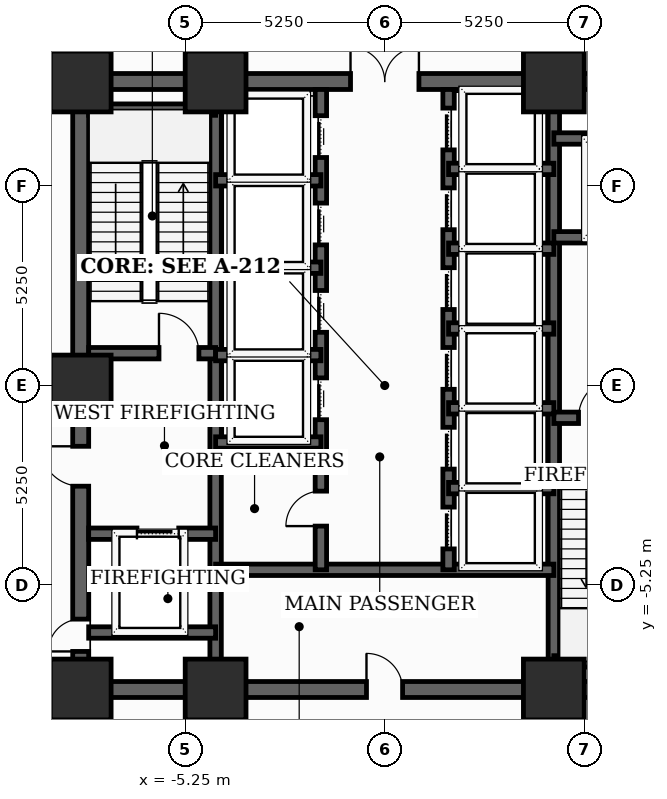
"""IFC4 building model, lengths in metres.
Left out: names, types, materials, properties, quantities, classifications, styles, units other than length and angle.
Written with IfcOpenShell. Run it as: python <this file> out.ifc"""

import sys

from ifc_helpers import new_model, si_unit, direction, frame, frame_2d, origin, origin_2d, place, context, subcontext, project, spatial, rectangle, extrude, element, fill, save


model = new_model("IFC4")
c1 = context("Model", 3, precision=1e-05, world=origin(), true_north=direction((0.0, 1.0)))
c2 = subcontext(c1, "Body", "Model", "MODEL_VIEW")
j1 = project(units=[si_unit("LENGTHUNIT", "METRE"), si_unit("PLANEANGLEUNIT", "RADIAN")], contexts=[c1])
p1 = place(None, origin())
s1 = spatial("IfcSite", under=j1, at=p1, CompositionType="ELEMENT")
p2 = place(p1, origin())
s2 = spatial("IfcBuilding", under=s1, at=p2, CompositionType="ELEMENT")
p3 = place(p2, frame((0.0, 0.0, 15.6)))
s3 = spatial("IfcBuildingStorey", under=s2, at=p3, CompositionType="ELEMENT", Elevation=15.6)
for number, where, z_axis, x_axis in (
    (1, (-8.0, -8.0, 0.0), (0.0, 0.0, 1.0), (1.0, 0.0, 0.0)),
    (2, (-4.45, -8.0, 0.0), (0.0, 0.0, 1.0), (1.0, 0.0, 0.0)),
    (3, (4.45, -8.0, 0.0), (0.0, 0.0, 1.0), (1.0, 0.0, 0.0)),
    (4, (4.45, 8.0, 0.0), (0.0, 0.0, 1.0), (1.0, 0.0, 0.0)),
    (5, (-4.45, 8.0, 0.0), (0.0, 0.0, 1.0), (1.0, 0.0, 0.0)),
    (6, (-8.0, 8.0, 0.0), (0.0, 0.0, 1.0), (1.0, 0.0, 0.0)),
    (7, (-8.0, 0.0, 0.0), (0.0, 0.0, 1.0), (1.0, 0.0, 0.0)),
):
    element("IfcColumn", number, at=place(p3, frame(where, z_axis=z_axis, x_axis=x_axis)), inside=s3, PredefinedType="COLUMN", context=c2, shape_type="SweptSolid", body=[
        extrude(rectangle(XDim=1.6, YDim=1.6, at=origin_2d()), origin(), (0.0, 0.0, 1.0), 5.2),
    ])
p4 = place(p3, frame((-8.0, -8.0, 0.0), z_axis=(0.0, 0.0, 1.0), x_axis=(0.0, 1.0, 0.0)))
e8 = element("IfcWall", 8, at=p4, inside=s3, PredefinedType="SHEAR", context=c2, shape_type="SweptSolid", body=[
    extrude(rectangle(XDim=16.0, YDim=0.42, at=frame_2d((8.0, 0.0))), origin(), (0.0, 0.0, 1.0), 4.95),
])
p5 = place(p4, frame((1.002, 0.0, 0.0)))
e9 = element("IfcOpeningElement", 9, at=p5, cuts=e8, PredefinedType="OPENING", context=c2, shape_type="SweptSolid", body=[
    extrude(rectangle(XDim=0.85, YDim=2.02, at=frame_2d((0.425, 1.01))), frame((0.0, 0.22, 0.0), z_axis=(0.0, -1.0, 0.0), x_axis=(1.0, 0.0, 0.0)), (0.0, 0.0, 1.0), 0.44),
])
p6 = place(p4, frame((5.35, 0.0, 0.0)))
e10 = element("IfcOpeningElement", 10, at=p6, cuts=e8, PredefinedType="OPENING", context=c2, shape_type="SweptSolid", body=[
    extrude(rectangle(XDim=1.05, YDim=2.15, at=frame_2d((0.525, 1.075))), frame((0.0, 0.22, 0.0), z_axis=(0.0, -1.0, 0.0), x_axis=(1.0, 0.0, 0.0)), (0.0, 0.0, 1.0), 0.44),
])
p7 = place(p3, frame((-8.0, -8.0, 0.0), z_axis=(0.0, 0.0, 1.0), x_axis=(1.0, 0.0, 0.0)))
e11 = element("IfcWall", 11, at=p7, inside=s3, PredefinedType="SHEAR", context=c2, shape_type="SweptSolid", body=[
    extrude(rectangle(XDim=16.0, YDim=0.42, at=frame_2d((8.0, 0.0))), origin(), (0.0, 0.0, 1.0), 4.95),
])
p8 = place(p7, frame((7.52, 0.0, 0.0)))
e12 = element("IfcOpeningElement", 12, at=p8, cuts=e11, PredefinedType="OPENING", context=c2, shape_type="SweptSolid", body=[
    extrude(rectangle(XDim=0.95, YDim=2.1, at=frame_2d((0.475, 1.05))), frame((0.0, 0.22, 0.0), z_axis=(0.0, -1.0, 0.0), x_axis=(1.0, 0.0, 0.0)), (0.0, 0.0, 1.0), 0.44),
])
p9 = place(p3, frame((-8.0, 8.0, 0.0), z_axis=(0.0, 0.0, 1.0), x_axis=(1.0, 0.0, 0.0)))
e13 = element("IfcWall", 13, at=p9, inside=s3, PredefinedType="SHEAR", context=c2, shape_type="SweptSolid", body=[
    extrude(rectangle(XDim=16.0, YDim=0.42, at=frame_2d((8.0, 0.0))), origin(), (0.0, 0.0, 1.0), 4.95),
])
p10 = place(p9, frame((7.1, 0.0, 0.0)))
e14 = element("IfcOpeningElement", 14, at=p10, cuts=e13, PredefinedType="OPENING", context=c2, shape_type="SweptSolid", body=[
    extrude(rectangle(XDim=1.8, YDim=2.15, at=frame_2d((0.9, 1.075))), frame((0.0, 0.22, 0.0), z_axis=(0.0, -1.0, 0.0), x_axis=(1.0, 0.0, 0.0)), (0.0, 0.0, 1.0), 0.44),
])
for number, where, z_axis, x_axis in (
    (15, (-4.45, -7.79, 0.0), (0.0, 0.0, 1.0), (0.0, 1.0, 0.0)),
    (16, (4.45, -7.79, 0.0), (0.0, 0.0, 1.0), (0.0, 1.0, 0.0)),
):
    element("IfcWall", number, at=place(p3, frame(where, z_axis=z_axis, x_axis=x_axis)), inside=s3, PredefinedType="SHEAR", context=c2, shape_type="SweptSolid", body=[
        extrude(rectangle(XDim=15.58, YDim=0.3, at=frame_2d((7.79, 0.0))), origin(), (0.0, 0.0, 1.0), 4.95),
    ])
p11 = place(p3, frame((-7.79, 0.85, 0.0), z_axis=(0.0, 0.0, 1.0), x_axis=(1.0, 0.0, 0.0)))
e17 = element("IfcWall", 17, at=p11, inside=s3, PredefinedType="SHEAR", context=c2, shape_type="SweptSolid", body=[
    extrude(rectangle(XDim=3.34, YDim=0.3, at=frame_2d((1.67, 0.0))), origin(), (0.0, 0.0, 1.0), 4.95),
])
p12 = place(p11, frame((1.85, 0.0, 0.0)))
e18 = element("IfcOpeningElement", 18, at=p12, cuts=e17, PredefinedType="OPENING", context=c2, shape_type="SweptSolid", body=[
    extrude(rectangle(XDim=1.05, YDim=2.15, at=frame_2d((0.525, 1.075))), frame((0.0, 0.16, 0.0), z_axis=(0.0, -1.0, 0.0), x_axis=(1.0, 0.0, 0.0)), (0.0, 0.0, 1.0), 0.32),
])
p13 = place(p3, frame((-7.79, 7.26, 0.0), z_axis=(0.0, 0.0, 1.0), x_axis=(1.0, 0.0, 0.0)))
e19 = element("IfcWall", 19, at=p13, inside=s3, PredefinedType="SHEAR", context=c2, shape_type="SweptSolid", body=[
    extrude(rectangle(XDim=3.34, YDim=0.3, at=frame_2d((1.67, 0.0))), origin(), (0.0, 0.0, 1.0), 4.95),
])
p14 = place(p3, frame((4.45, -0.85, 0.0), z_axis=(0.0, 0.0, 1.0), x_axis=(1.0, 0.0, 0.0)))
e20 = element("IfcWall", 20, at=p14, inside=s3, PredefinedType="SHEAR", context=c2, shape_type="SweptSolid", body=[
    extrude(rectangle(XDim=3.34, YDim=0.3, at=frame_2d((1.67, 0.0))), origin(), (0.0, 0.0, 1.0), 4.95),
])
p15 = place(p14, frame((0.65, 0.0, 0.0)))
e21 = element("IfcOpeningElement", 21, at=p15, cuts=e20, PredefinedType="OPENING", context=c2, shape_type="SweptSolid", body=[
    extrude(rectangle(XDim=1.05, YDim=2.15, at=frame_2d((0.525, 1.075))), frame((0.0, 0.16, 0.0), z_axis=(0.0, -1.0, 0.0), x_axis=(1.0, 0.0, 0.0)), (0.0, 0.0, 1.0), 0.32),
])
p16 = place(p3, frame((4.45, -7.26, 0.0), z_axis=(0.0, 0.0, 1.0), x_axis=(1.0, 0.0, 0.0)))
e22 = element("IfcWall", 22, at=p16, inside=s3, PredefinedType="SHEAR", context=c2, shape_type="SweptSolid", body=[
    extrude(rectangle(XDim=3.55, YDim=0.3, at=frame_2d((1.775, 0.0))), origin(), (0.0, 0.0, 1.0), 4.95),
])
p17 = place(p3, frame((-7.79, -3.9, 0.0), z_axis=(0.0, 0.0, 1.0), x_axis=(1.0, 0.0, 0.0)))
e23 = element("IfcWall", 23, at=p17, inside=s3, PredefinedType="SHEAR", context=c2, shape_type="SweptSolid", body=[
    extrude(rectangle(XDim=3.34, YDim=0.3, at=frame_2d((1.67, 0.0))), origin(), (0.0, 0.0, 1.0), 4.95),
])
p18 = place(p17, frame((1.27, 0.0, 0.0)))
e24 = element("IfcOpeningElement", 24, at=p18, cuts=e23, PredefinedType="OPENING", context=c2, shape_type="SweptSolid", body=[
    extrude(rectangle(XDim=1.1, YDim=2.1, at=frame_2d((0.55, 1.05))), frame((0.0, 0.16, 0.0), z_axis=(0.0, -1.0, 0.0), x_axis=(1.0, 0.0, 0.0)), (0.0, 0.0, 1.0), 0.32),
])
p19 = place(p3, frame((-7.79, -6.5, 0.0), z_axis=(0.0, 0.0, 1.0), x_axis=(1.0, 0.0, 0.0)))
e25 = element("IfcWall", 25, at=p19, inside=s3, PredefinedType="SHEAR", context=c2, shape_type="SweptSolid", body=[
    extrude(rectangle(XDim=3.34, YDim=0.3, at=frame_2d((1.67, 0.0))), origin(), (0.0, 0.0, 1.0), 4.95),
])
p20 = place(p3, frame((4.45, 3.9, 0.0), z_axis=(0.0, 0.0, 1.0), x_axis=(1.0, 0.0, 0.0)))
e26 = element("IfcWall", 26, at=p20, inside=s3, PredefinedType="SHEAR", context=c2, shape_type="SweptSolid", body=[
    extrude(rectangle(XDim=3.34, YDim=0.3, at=frame_2d((1.67, 0.0))), origin(), (0.0, 0.0, 1.0), 4.95),
])
p21 = place(p20, frame((1.18, 0.0, 0.0)))
e27 = element("IfcOpeningElement", 27, at=p21, cuts=e26, PredefinedType="OPENING", context=c2, shape_type="SweptSolid", body=[
    extrude(rectangle(XDim=1.1, YDim=2.1, at=frame_2d((0.55, 1.05))), frame((0.0, 0.16, 0.0), z_axis=(0.0, -1.0, 0.0), x_axis=(1.0, 0.0, 0.0)), (0.0, 0.0, 1.0), 0.32),
])
p22 = place(p3, frame((4.45, 6.5, 0.0), z_axis=(0.0, 0.0, 1.0), x_axis=(1.0, 0.0, 0.0)))
e28 = element("IfcWall", 28, at=p22, inside=s3, PredefinedType="SHEAR", context=c2, shape_type="SweptSolid", body=[
    extrude(rectangle(XDim=3.34, YDim=0.3, at=frame_2d((1.67, 0.0))), origin(), (0.0, 0.0, 1.0), 4.95),
])
p23 = place(p3, frame((-4.45, -4.85, 0.0), z_axis=(0.0, 0.0, 1.0), x_axis=(1.0, 0.0, 0.0)))
e29 = element("IfcWall", 29, at=p23, inside=s3, PredefinedType="SHEAR", context=c2, shape_type="SweptSolid", body=[
    extrude(rectangle(XDim=8.9, YDim=0.3, at=frame_2d((4.45, 0.0))), origin(), (0.0, 0.0, 1.0), 4.95),
])
p24 = place(p3, frame((-1.68, -4.85, 0.0), z_axis=(0.0, 0.0, 1.0), x_axis=(0.0, 1.0, 0.0)))
e30 = element("IfcWall", 30, at=p24, inside=s3, PredefinedType="SHEAR", context=c2, shape_type="SweptSolid", body=[
    extrude(rectangle(XDim=12.64, YDim=0.3, at=frame_2d((6.32, 0.0))), origin(), (0.0, 0.0, 1.0), 4.95),
])
p25 = place(p24, frame((3.95, 0.0, 0.0)))
e31 = element("IfcOpeningElement", 31, at=p25, cuts=e30, PredefinedType="OPENING", context=c2, shape_type="SweptSolid", body=[
    extrude(rectangle(XDim=1.1, YDim=2.1, at=frame_2d((0.55, 1.05))), frame((0.0, 0.16, 0.0), z_axis=(0.0, -1.0, 0.0), x_axis=(1.0, 0.0, 0.0)), (0.0, 0.0, 1.0), 0.32),
])
p26 = place(p24, frame((6.25, 0.0, 0.0)))
e32 = element("IfcOpeningElement", 32, at=p26, cuts=e30, PredefinedType="OPENING", context=c2, shape_type="SweptSolid", body=[
    extrude(rectangle(XDim=1.1, YDim=2.1, at=frame_2d((0.55, 1.05))), frame((0.0, 0.16, 0.0), z_axis=(0.0, -1.0, 0.0), x_axis=(1.0, 0.0, 0.0)), (0.0, 0.0, 1.0), 0.32),
])
p27 = place(p24, frame((8.55, 0.0, 0.0)))
e33 = element("IfcOpeningElement", 33, at=p27, cuts=e30, PredefinedType="OPENING", context=c2, shape_type="SweptSolid", body=[
    extrude(rectangle(XDim=1.1, YDim=2.1, at=frame_2d((0.55, 1.05))), frame((0.0, 0.16, 0.0), z_axis=(0.0, -1.0, 0.0), x_axis=(1.0, 0.0, 0.0)), (0.0, 0.0, 1.0), 0.32),
])
p28 = place(p24, frame((10.85, 0.0, 0.0)))
e34 = element("IfcOpeningElement", 34, at=p28, cuts=e30, PredefinedType="OPENING", context=c2, shape_type="SweptSolid", body=[
    extrude(rectangle(XDim=1.1, YDim=2.1, at=frame_2d((0.55, 1.05))), frame((0.0, 0.16, 0.0), z_axis=(0.0, -1.0, 0.0), x_axis=(1.0, 0.0, 0.0)), (0.0, 0.0, 1.0), 0.32),
])
p29 = place(p24, frame((1.15, 0.0, 0.0)))
e35 = element("IfcOpeningElement", 35, at=p29, cuts=e30, PredefinedType="OPENING", context=c2, shape_type="SweptSolid", body=[
    extrude(rectangle(XDim=0.92, YDim=2.1, at=frame_2d((0.46, 1.05))), frame((0.0, 0.16, 0.0), z_axis=(0.0, -1.0, 0.0), x_axis=(1.0, 0.0, 0.0)), (0.0, 0.0, 1.0), 0.32),
])
p30 = place(p3, frame((1.68, -4.85, 0.0), z_axis=(0.0, 0.0, 1.0), x_axis=(0.0, 1.0, 0.0)))
e36 = element("IfcWall", 36, at=p30, inside=s3, PredefinedType="SHEAR", context=c2, shape_type="SweptSolid", body=[
    extrude(rectangle(XDim=12.64, YDim=0.3, at=frame_2d((6.32, 0.0))), origin(), (0.0, 0.0, 1.0), 4.95),
])
p31 = place(p30, frame((0.55, 0.0, 0.0)))
e37 = element("IfcOpeningElement", 37, at=p31, cuts=e36, PredefinedType="OPENING", context=c2, shape_type="SweptSolid", body=[
    extrude(rectangle(XDim=1.1, YDim=2.1, at=frame_2d((0.55, 1.05))), frame((0.0, 0.16, 0.0), z_axis=(0.0, -1.0, 0.0), x_axis=(1.0, 0.0, 0.0)), (0.0, 0.0, 1.0), 0.32),
])
p32 = place(p30, frame((2.65, 0.0, 0.0)))
e38 = element("IfcOpeningElement", 38, at=p32, cuts=e36, PredefinedType="OPENING", context=c2, shape_type="SweptSolid", body=[
    extrude(rectangle(XDim=1.1, YDim=2.1, at=frame_2d((0.55, 1.05))), frame((0.0, 0.16, 0.0), z_axis=(0.0, -1.0, 0.0), x_axis=(1.0, 0.0, 0.0)), (0.0, 0.0, 1.0), 0.32),
])
p33 = place(p30, frame((4.75, 0.0, 0.0)))
e39 = element("IfcOpeningElement", 39, at=p33, cuts=e36, PredefinedType="OPENING", context=c2, shape_type="SweptSolid", body=[
    extrude(rectangle(XDim=1.1, YDim=2.1, at=frame_2d((0.55, 1.05))), frame((0.0, 0.16, 0.0), z_axis=(0.0, -1.0, 0.0), x_axis=(1.0, 0.0, 0.0)), (0.0, 0.0, 1.0), 0.32),
])
p34 = place(p30, frame((6.85, 0.0, 0.0)))
e40 = element("IfcOpeningElement", 40, at=p34, cuts=e36, PredefinedType="OPENING", context=c2, shape_type="SweptSolid", body=[
    extrude(rectangle(XDim=1.1, YDim=2.1, at=frame_2d((0.55, 1.05))), frame((0.0, 0.16, 0.0), z_axis=(0.0, -1.0, 0.0), x_axis=(1.0, 0.0, 0.0)), (0.0, 0.0, 1.0), 0.32),
])
p35 = place(p30, frame((8.95, 0.0, 0.0)))
e41 = element("IfcOpeningElement", 41, at=p35, cuts=e36, PredefinedType="OPENING", context=c2, shape_type="SweptSolid", body=[
    extrude(rectangle(XDim=1.1, YDim=2.1, at=frame_2d((0.55, 1.05))), frame((0.0, 0.16, 0.0), z_axis=(0.0, -1.0, 0.0), x_axis=(1.0, 0.0, 0.0)), (0.0, 0.0, 1.0), 0.32),
])
p36 = place(p30, frame((11.05, 0.0, 0.0)))
e42 = element("IfcOpeningElement", 42, at=p36, cuts=e36, PredefinedType="OPENING", context=c2, shape_type="SweptSolid", body=[
    extrude(rectangle(XDim=1.1, YDim=2.1, at=frame_2d((0.55, 1.05))), frame((0.0, 0.16, 0.0), z_axis=(0.0, -1.0, 0.0), x_axis=(1.0, 0.0, 0.0)), (0.0, 0.0, 1.0), 0.32),
])
for number, where, z_axis, x_axis in (
    (43, (-4.45, -1.5, 0.0), (0.0, 0.0, 1.0), (1.0, 0.0, 0.0)),
    (44, (-4.45, 0.8, 0.0), (0.0, 0.0, 1.0), (1.0, 0.0, 0.0)),
    (45, (-4.45, 3.1, 0.0), (0.0, 0.0, 1.0), (1.0, 0.0, 0.0)),
    (46, (-4.45, 5.4, 0.0), (0.0, 0.0, 1.0), (1.0, 0.0, 0.0)),
    (47, (1.68, 1.5, 0.0), (0.0, 0.0, 1.0), (1.0, 0.0, 0.0)),
    (48, (1.68, 3.6, 0.0), (0.0, 0.0, 1.0), (1.0, 0.0, 0.0)),
    (49, (1.68, 5.7, 0.0), (0.0, 0.0, 1.0), (1.0, 0.0, 0.0)),
    (50, (1.68, -2.7, 0.0), (0.0, 0.0, 1.0), (1.0, 0.0, 0.0)),
    (51, (1.68, -0.6, 0.0), (0.0, 0.0, 1.0), (1.0, 0.0, 0.0)),
):
    element("IfcWall", number, at=place(p3, frame(where, z_axis=z_axis, x_axis=x_axis)), inside=s3, PredefinedType="SHEAR", context=c2, shape_type="SweptSolid", body=[
        extrude(rectangle(XDim=2.77, YDim=0.3, at=frame_2d((1.385, 0.0))), origin(), (0.0, 0.0, 1.0), 4.95),
    ])
p37 = place(p5, origin())
e52 = element("IfcDoor", 52, at=p37, inside=s3, OperationType="SINGLE_SWING_LEFT", PredefinedType="TRAPDOOR", context=c2, shape_type="SweptSolid", body=[
    extrude(rectangle(XDim=0.85, YDim=2.02, at=frame_2d((0.425, 1.01))), frame((0.0, 0.025, 0.0), z_axis=(0.0, -1.0, 0.0), x_axis=(1.0, 0.0, 0.0)), (0.0, 0.0, 1.0), 0.05),
])
fill(e9, e52)
p38 = place(p6, origin())
e53 = element("IfcDoor", 53, at=p38, inside=s3, OperationType="SINGLE_SWING_RIGHT", PredefinedType="DOOR", context=c2, shape_type="SweptSolid", body=[
    extrude(rectangle(XDim=1.05, YDim=2.15, at=frame_2d((0.525, 1.075))), frame((0.0, 0.025, 0.0), z_axis=(0.0, -1.0, 0.0), x_axis=(1.0, 0.0, 0.0)), (0.0, 0.0, 1.0), 0.05),
])
fill(e10, e53)
p39 = place(p8, origin())
e54 = element("IfcDoor", 54, at=p39, inside=s3, OperationType="SINGLE_SWING_LEFT", PredefinedType="DOOR", context=c2, shape_type="SweptSolid", body=[
    extrude(rectangle(XDim=0.95, YDim=2.1, at=frame_2d((0.475, 1.05))), frame((0.0, 0.025, 0.0), z_axis=(0.0, -1.0, 0.0), x_axis=(1.0, 0.0, 0.0)), (0.0, 0.0, 1.0), 0.05),
])
fill(e12, e54)
p40 = place(p10, origin())
e55 = element("IfcDoor", 55, at=p40, inside=s3, OperationType="DOUBLE_DOOR_SINGLE_SWING", PredefinedType="DOOR", context=c2, shape_type="SweptSolid", body=[
    extrude(rectangle(XDim=1.8, YDim=2.15, at=frame_2d((0.9, 1.075))), frame((0.0, 0.025, 0.0), z_axis=(0.0, -1.0, 0.0), x_axis=(1.0, 0.0, 0.0)), (0.0, 0.0, 1.0), 0.05),
])
fill(e14, e55)
p41 = place(p12, origin())
e56 = element("IfcDoor", 56, at=p41, inside=s3, OperationType="SINGLE_SWING_LEFT", PredefinedType="DOOR", context=c2, shape_type="SweptSolid", body=[
    extrude(rectangle(XDim=1.05, YDim=2.15, at=frame_2d((0.525, 1.075))), frame((0.0, 0.025, 0.0), z_axis=(0.0, -1.0, 0.0), x_axis=(1.0, 0.0, 0.0)), (0.0, 0.0, 1.0), 0.05),
])
fill(e18, e56)
p42 = place(p15, origin())
e57 = element("IfcDoor", 57, at=p42, inside=s3, OperationType="SINGLE_SWING_RIGHT", PredefinedType="DOOR", context=c2, shape_type="SweptSolid", body=[
    extrude(rectangle(XDim=1.05, YDim=2.15, at=frame_2d((0.525, 1.075))), frame((0.0, 0.025, 0.0), z_axis=(0.0, -1.0, 0.0), x_axis=(1.0, 0.0, 0.0)), (0.0, 0.0, 1.0), 0.05),
])
fill(e21, e57)
p43 = place(p18, origin())
e58 = element("IfcDoor", 58, at=p43, inside=s3, OperationType="SLIDING_TO_LEFT", PredefinedType="DOOR", context=c2, shape_type="SweptSolid", body=[
    extrude(rectangle(XDim=1.1, YDim=2.1, at=frame_2d((0.55, 1.05))), frame((0.0, 0.025, 0.0), z_axis=(0.0, -1.0, 0.0), x_axis=(1.0, 0.0, 0.0)), (0.0, 0.0, 1.0), 0.05),
])
fill(e24, e58)
p44 = place(p25, origin())
e59 = element("IfcDoor", 59, at=p44, inside=s3, OperationType="SLIDING_TO_LEFT", PredefinedType="DOOR", context=c2, shape_type="SweptSolid", body=[
    extrude(rectangle(XDim=1.1, YDim=2.1, at=frame_2d((0.55, 1.05))), frame((0.0, 0.025, 0.0), z_axis=(0.0, -1.0, 0.0), x_axis=(1.0, 0.0, 0.0)), (0.0, 0.0, 1.0), 0.05),
])
fill(e31, e59)
p45 = place(p26, origin())
e60 = element("IfcDoor", 60, at=p45, inside=s3, OperationType="SLIDING_TO_LEFT", PredefinedType="DOOR", context=c2, shape_type="SweptSolid", body=[
    extrude(rectangle(XDim=1.1, YDim=2.1, at=frame_2d((0.55, 1.05))), frame((0.0, 0.025, 0.0), z_axis=(0.0, -1.0, 0.0), x_axis=(1.0, 0.0, 0.0)), (0.0, 0.0, 1.0), 0.05),
])
fill(e32, e60)
p46 = place(p27, origin())
e61 = element("IfcDoor", 61, at=p46, inside=s3, OperationType="SLIDING_TO_LEFT", PredefinedType="DOOR", context=c2, shape_type="SweptSolid", body=[
    extrude(rectangle(XDim=1.1, YDim=2.1, at=frame_2d((0.55, 1.05))), frame((0.0, 0.025, 0.0), z_axis=(0.0, -1.0, 0.0), x_axis=(1.0, 0.0, 0.0)), (0.0, 0.0, 1.0), 0.05),
])
fill(e33, e61)
p47 = place(p28, origin())
e62 = element("IfcDoor", 62, at=p47, inside=s3, OperationType="SLIDING_TO_LEFT", PredefinedType="DOOR", context=c2, shape_type="SweptSolid", body=[
    extrude(rectangle(XDim=1.1, YDim=2.1, at=frame_2d((0.55, 1.05))), frame((0.0, 0.025, 0.0), z_axis=(0.0, -1.0, 0.0), x_axis=(1.0, 0.0, 0.0)), (0.0, 0.0, 1.0), 0.05),
])
fill(e34, e62)
p48 = place(p29, origin())
e63 = element("IfcDoor", 63, at=p48, inside=s3, OperationType="SINGLE_SWING_LEFT", PredefinedType="DOOR", context=c2, shape_type="SweptSolid", body=[
    extrude(rectangle(XDim=0.92, YDim=2.1, at=frame_2d((0.46, 1.05))), frame((0.0, 0.025, 0.0), z_axis=(0.0, -1.0, 0.0), x_axis=(1.0, 0.0, 0.0)), (0.0, 0.0, 1.0), 0.05),
])
fill(e35, e63)
p49 = place(p31, origin())
e64 = element("IfcDoor", 64, at=p49, inside=s3, OperationType="SLIDING_TO_LEFT", PredefinedType="DOOR", context=c2, shape_type="SweptSolid", body=[
    extrude(rectangle(XDim=1.1, YDim=2.1, at=frame_2d((0.55, 1.05))), frame((0.0, 0.025, 0.0), z_axis=(0.0, -1.0, 0.0), x_axis=(1.0, 0.0, 0.0)), (0.0, 0.0, 1.0), 0.05),
])
fill(e37, e64)
p50 = place(p32, origin())
e65 = element("IfcDoor", 65, at=p50, inside=s3, OperationType="SLIDING_TO_LEFT", PredefinedType="DOOR", context=c2, shape_type="SweptSolid", body=[
    extrude(rectangle(XDim=1.1, YDim=2.1, at=frame_2d((0.55, 1.05))), frame((0.0, 0.025, 0.0), z_axis=(0.0, -1.0, 0.0), x_axis=(1.0, 0.0, 0.0)), (0.0, 0.0, 1.0), 0.05),
])
fill(e38, e65)
p51 = place(p33, origin())
e66 = element("IfcDoor", 66, at=p51, inside=s3, OperationType="SLIDING_TO_LEFT", PredefinedType="DOOR", context=c2, shape_type="SweptSolid", body=[
    extrude(rectangle(XDim=1.1, YDim=2.1, at=frame_2d((0.55, 1.05))), frame((0.0, 0.025, 0.0), z_axis=(0.0, -1.0, 0.0), x_axis=(1.0, 0.0, 0.0)), (0.0, 0.0, 1.0), 0.05),
])
fill(e39, e66)
p52 = place(p34, origin())
e67 = element("IfcDoor", 67, at=p52, inside=s3, OperationType="SLIDING_TO_LEFT", PredefinedType="DOOR", context=c2, shape_type="SweptSolid", body=[
    extrude(rectangle(XDim=1.1, YDim=2.1, at=frame_2d((0.55, 1.05))), frame((0.0, 0.025, 0.0), z_axis=(0.0, -1.0, 0.0), x_axis=(1.0, 0.0, 0.0)), (0.0, 0.0, 1.0), 0.05),
])
fill(e40, e67)
p53 = place(p35, origin())
e68 = element("IfcDoor", 68, at=p53, inside=s3, OperationType="SLIDING_TO_LEFT", PredefinedType="DOOR", context=c2, shape_type="SweptSolid", body=[
    extrude(rectangle(XDim=1.1, YDim=2.1, at=frame_2d((0.55, 1.05))), frame((0.0, 0.025, 0.0), z_axis=(0.0, -1.0, 0.0), x_axis=(1.0, 0.0, 0.0)), (0.0, 0.0, 1.0), 0.05),
])
fill(e41, e68)
p54 = place(p36, origin())
e69 = element("IfcDoor", 69, at=p54, inside=s3, OperationType="SLIDING_TO_LEFT", PredefinedType="DOOR", context=c2, shape_type="SweptSolid", body=[
    extrude(rectangle(XDim=1.1, YDim=2.1, at=frame_2d((0.55, 1.05))), frame((0.0, 0.025, 0.0), z_axis=(0.0, -1.0, 0.0), x_axis=(1.0, 0.0, 0.0)), (0.0, 0.0, 1.0), 0.05),
])
fill(e42, e69)
save(model, sys.argv[1])
